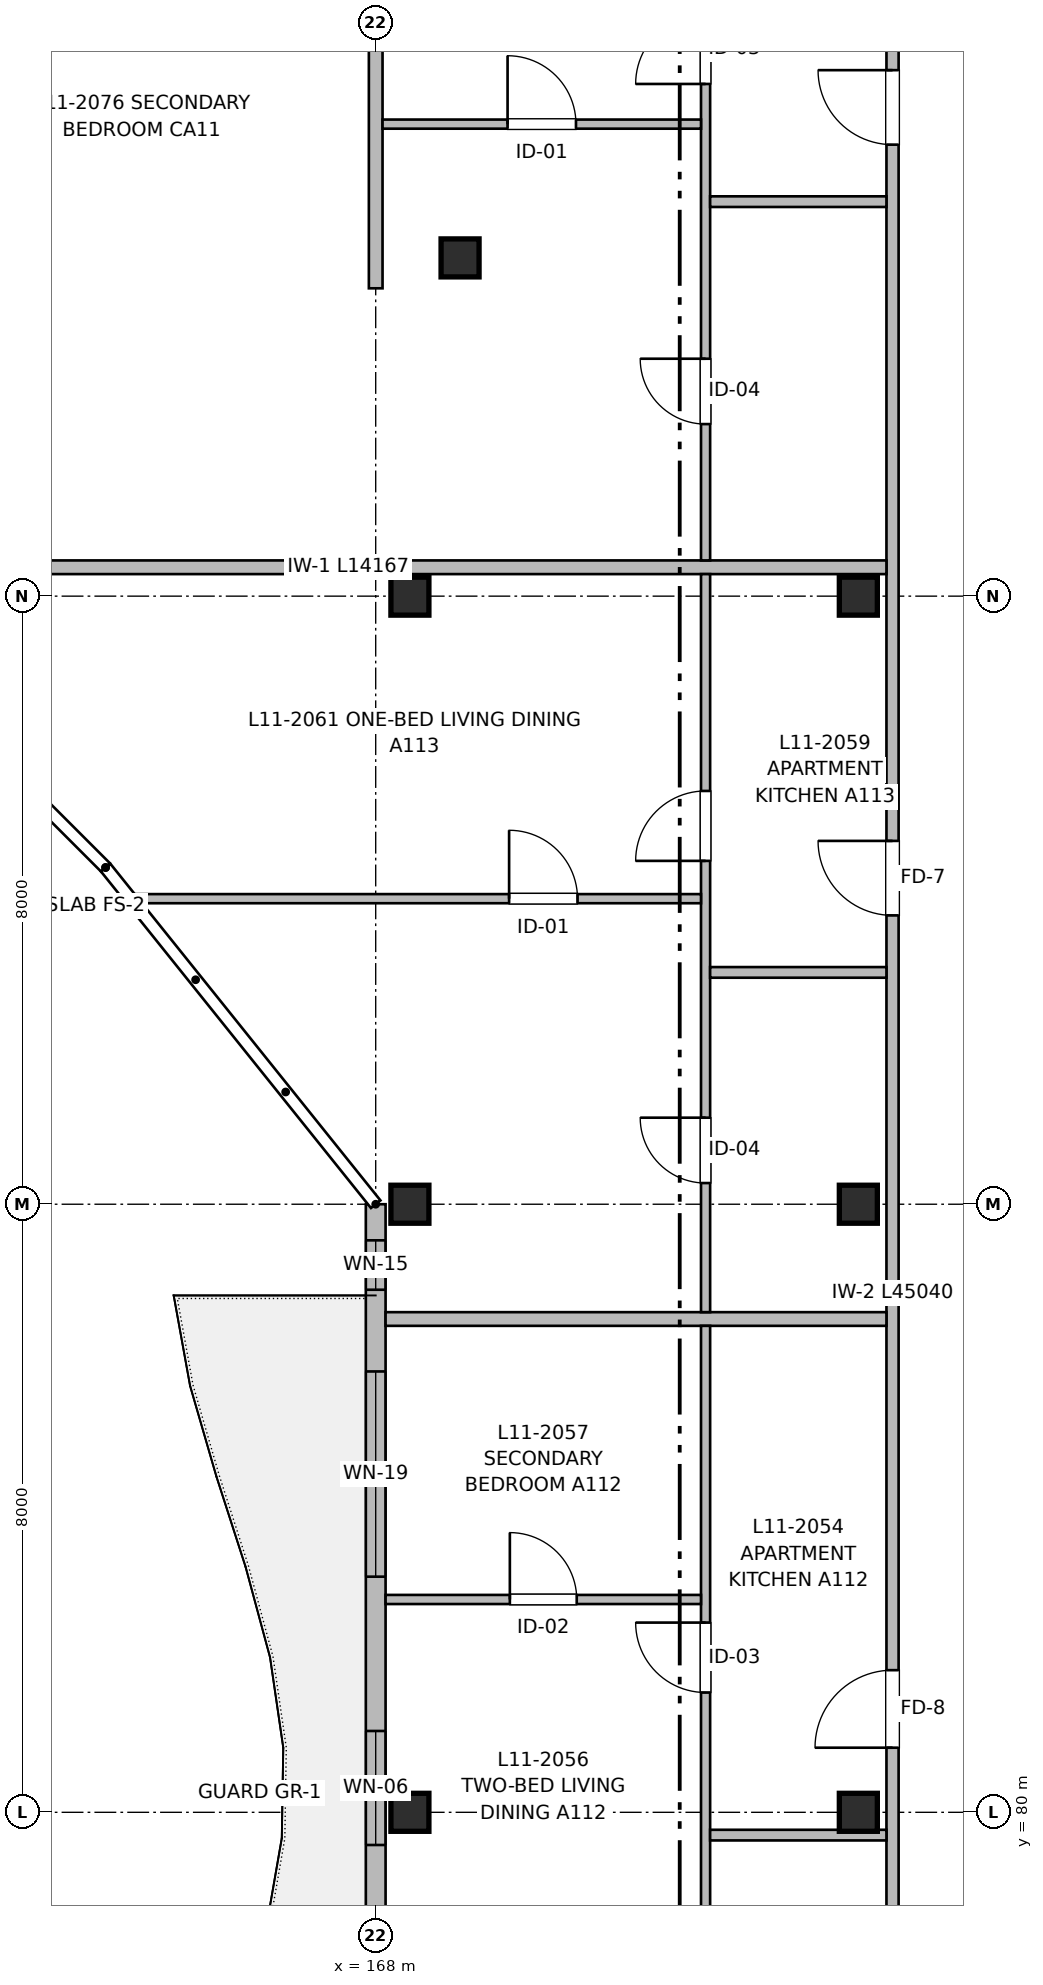
"""IFC4 building model, lengths in metres.
Left out: names, types, materials, properties, quantities, classifications, styles, units other than length and angle.
Written with IfcOpenShell. Run it as: python <this file> out.ifc"""

import sys

from ifc_helpers import new_model, si_unit, direction, frame, frame_2d, origin, origin_2d, place, context, subcontext, project, spatial, rectangle, extrude, element, fill, save


model = new_model("IFC4")
c1 = context("Model", 3, precision=1e-05, world=origin(), true_north=direction((0.0, 1.0)))
c2 = subcontext(c1, "Body", "Model", "MODEL_VIEW")
j1 = project(units=[si_unit("LENGTHUNIT", "METRE"), si_unit("PLANEANGLEUNIT", "RADIAN")], contexts=[c1])
p1 = place(None, origin())
s1 = spatial("IfcSite", under=j1, at=p1, CompositionType="ELEMENT")
p2 = place(p1, origin())
s2 = spatial("IfcBuilding", under=s1, at=p2, CompositionType="ELEMENT")
p3 = place(p2, frame((0.0, 0.0, 36.16)))
s3 = spatial("IfcBuildingStorey", under=s2, at=p3, CompositionType="ELEMENT", Elevation=36.16)
for number, where, z_axis, x_axis in (
    (1, (168.45, 80.0, 0.0), (0.0, 0.0, 1.0), (1.0, 0.0, 0.0)),
    (2, (168.45, 88.0, 0.0), (0.0, 0.0, 1.0), (1.0, 0.0, 0.0)),
    (3, (168.45, 96.0, 0.0), (0.0, 0.0, 1.0), (1.0, 0.0, 0.0)),
    (4, (169.11, 100.45, 0.0), (0.0, 0.0, 1.0), (1.0, 0.0, 0.0)),
    (5, (174.35, 80.0, 0.0), (0.0, 0.0, 1.0), (1.0, 0.0, 0.0)),
    (6, (174.35, 88.0, 0.0), (0.0, 0.0, 1.0), (1.0, 0.0, 0.0)),
    (7, (174.35, 96.0, 0.0), (0.0, 0.0, 1.0), (1.0, 0.0, 0.0)),
):
    element("IfcColumn", number, at=place(p3, frame(where, z_axis=z_axis, x_axis=x_axis)), inside=s3, PredefinedType="COLUMN", context=c2, shape_type="SweptSolid", body=[
        extrude(rectangle(XDim=0.5, YDim=0.5, at=origin_2d()), origin(), (0.0, 0.0, 1.0), 3.2),
    ])
p4 = place(p3, frame((168.0, 61.6, 0.0), z_axis=(0.0, 0.0, 1.0), x_axis=(0.0, 1.0, 0.0)))
e8 = element("IfcWall", 8, at=p4, inside=s3, PredefinedType="SOLIDWALL", context=c2, shape_type="SweptSolid", body=[
    extrude(rectangle(XDim=26.4, YDim=0.26, at=frame_2d((13.2, 0.0))), origin(), (0.0, 0.0, 1.0), 2.98),
])
p5 = place(p4, frame((3.8, 0.0, 0.0)))
e9 = element("IfcOpeningElement", 9, at=p5, cuts=e8, PredefinedType="OPENING", context=c2, shape_type="SweptSolid", body=[
    extrude(rectangle(XDim=1.2, YDim=2.2, at=frame_2d((0.6, 1.1))), frame((0.0, 0.14, 0.0), z_axis=(0.0, -1.0, 0.0), x_axis=(1.0, 0.0, 0.0)), (0.0, 0.0, 1.0), 0.28),
])
p6 = place(p4, frame((5.25, 0.0, 0.87)))
e10 = element("IfcOpeningElement", 10, at=p6, cuts=e8, PredefinedType="OPENING", context=c2, shape_type="SweptSolid", body=[
    extrude(rectangle(XDim=1.25, YDim=1.35, at=frame_2d((0.625, 0.675))), frame((0.0, 0.14, 0.0), z_axis=(0.0, -1.0, 0.0), x_axis=(1.0, 0.0, 0.0)), (0.0, 0.0, 1.0), 0.28),
])
p7 = place(p4, frame((12.65, 0.0, 0.62)))
e11 = element("IfcOpeningElement", 11, at=p7, cuts=e8, PredefinedType="OPENING", context=c2, shape_type="SweptSolid", body=[
    extrude(rectangle(XDim=1.1, YDim=1.6, at=frame_2d((0.55, 0.8))), frame((0.0, 0.14, 0.0), z_axis=(0.0, -1.0, 0.0), x_axis=(1.0, 0.0, 0.0)), (0.0, 0.0, 1.0), 0.28),
])
p8 = place(p4, frame((21.5, 0.0, 0.47)))
e12 = element("IfcOpeningElement", 12, at=p8, cuts=e8, PredefinedType="OPENING", context=c2, shape_type="SweptSolid", body=[
    extrude(rectangle(XDim=2.7, YDim=1.75, at=frame_2d((1.35, 0.875))), frame((0.0, 0.14, 0.0), z_axis=(0.0, -1.0, 0.0), x_axis=(1.0, 0.0, 0.0)), (0.0, 0.0, 1.0), 0.28),
])
p9 = place(p4, frame((8.835, 0.0, 0.82)))
e13 = element("IfcOpeningElement", 13, at=p9, cuts=e8, PredefinedType="OPENING", context=c2, shape_type="SweptSolid", body=[
    extrude(rectangle(XDim=1.5, YDim=1.4, at=frame_2d((0.75, 0.7))), frame((0.0, 0.14, 0.0), z_axis=(0.0, -1.0, 0.0), x_axis=(1.0, 0.0, 0.0)), (0.0, 0.0, 1.0), 0.28),
])
p10 = place(p4, frame((17.97, 0.0, 0.82)))
e14 = element("IfcOpeningElement", 14, at=p10, cuts=e8, PredefinedType="OPENING", context=c2, shape_type="SweptSolid", body=[
    extrude(rectangle(XDim=1.5, YDim=1.4, at=frame_2d((0.75, 0.7))), frame((0.0, 0.14, 0.0), z_axis=(0.0, -1.0, 0.0), x_axis=(1.0, 0.0, 0.0)), (0.0, 0.0, 1.0), 0.28),
])
p11 = place(p4, frame((25.275, 0.0, 0.9)))
e15 = element("IfcOpeningElement", 15, at=p11, cuts=e8, PredefinedType="OPENING", context=c2, shape_type="SweptSolid", body=[
    extrude(rectangle(XDim=0.65, YDim=0.95, at=frame_2d((0.325, 0.475))), frame((0.0, 0.14, 0.0), z_axis=(0.0, -1.0, 0.0), x_axis=(1.0, 0.0, 0.0)), (0.0, 0.0, 1.0), 0.28),
])
p12 = place(p3, frame((174.8, 61.76, 0.0), z_axis=(0.0, 0.0, 1.0), x_axis=(0.0, 1.0, 0.0)))
e16 = element("IfcWall", 16, at=p12, inside=s3, PredefinedType="PARTITIONING", context=c2, shape_type="SweptSolid", body=[
    extrude(rectangle(XDim=45.04, YDim=0.16, at=frame_2d((22.52, 0.0))), origin(), (0.0, 0.0, 1.0), 2.935),
])
p13 = place(p12, frame((6.29, 0.0, 0.0)))
e17 = element("IfcOpeningElement", 17, at=p13, cuts=e16, PredefinedType="OPENING", context=c2, shape_type="SweptSolid", body=[
    extrude(rectangle(XDim=0.98, YDim=2.15, at=frame_2d((0.49, 1.075))), frame((0.0, 0.09, 0.0), z_axis=(0.0, -1.0, 0.0), x_axis=(1.0, 0.0, 0.0)), (0.0, 0.0, 1.0), 0.18),
])
p14 = place(p12, frame((19.09, 0.0, 0.0)))
e18 = element("IfcOpeningElement", 18, at=p14, cuts=e16, PredefinedType="OPENING", context=c2, shape_type="SweptSolid", body=[
    extrude(rectangle(XDim=1.02, YDim=2.15, at=frame_2d((0.51, 1.075))), frame((0.0, 0.09, 0.0), z_axis=(0.0, -1.0, 0.0), x_axis=(1.0, 0.0, 0.0)), (0.0, 0.0, 1.0), 0.18),
])
p15 = place(p12, frame((30.04, 0.0, 0.0)))
e19 = element("IfcOpeningElement", 19, at=p15, cuts=e16, PredefinedType="OPENING", context=c2, shape_type="SweptSolid", body=[
    extrude(rectangle(XDim=0.98, YDim=2.15, at=frame_2d((0.49, 1.075))), frame((0.0, 0.09, 0.0), z_axis=(0.0, -1.0, 0.0), x_axis=(1.0, 0.0, 0.0)), (0.0, 0.0, 1.0), 0.18),
])
p16 = place(p12, frame((40.18, 0.0, 0.0)))
e20 = element("IfcOpeningElement", 20, at=p16, cuts=e16, PredefinedType="OPENING", context=c2, shape_type="SweptSolid", body=[
    extrude(rectangle(XDim=0.98, YDim=2.15, at=frame_2d((0.49, 1.075))), frame((0.0, 0.09, 0.0), z_axis=(0.0, -1.0, 0.0), x_axis=(1.0, 0.0, 0.0)), (0.0, 0.0, 1.0), 0.18),
])
p17 = place(p3, frame((168.0, 100.05, 0.0), z_axis=(0.0, 0.0, 1.0), x_axis=(0.0, 1.0, 0.0)))
e21 = element("IfcWall", 21, at=p17, inside=s3, PredefinedType="PARTITIONING", context=c2, shape_type="SweptSolid", body=[
    extrude(rectangle(XDim=6.67, YDim=0.18, at=frame_2d((3.335, 0.0))), origin(), (0.0, 0.0, 1.0), 2.935),
])
p18 = place(p3, frame((168.13, 86.49, 0.0), z_axis=(0.0, 0.0, 1.0), x_axis=(1.0, 0.0, 0.0)))
e22 = element("IfcWall", 22, at=p18, inside=s3, PredefinedType="PARTITIONING", context=c2, shape_type="SweptSolid", body=[
    extrude(rectangle(XDim=6.59, YDim=0.18, at=frame_2d((3.295, 0.0))), origin(), (0.0, 0.0, 1.0), 2.935),
])
p19 = place(p3, frame((160.552, 96.38, 0.0), z_axis=(0.0, 0.0, 1.0), x_axis=(1.0, 0.0, 0.0)))
e23 = element("IfcWall", 23, at=p19, inside=s3, PredefinedType="PARTITIONING", context=c2, shape_type="SweptSolid", body=[
    extrude(rectangle(XDim=14.167, YDim=0.18, at=frame_2d((7.084, 0.0))), origin(), (0.0, 0.0, 1.0), 2.935),
])
p20 = place(p3, frame((172.34, 73.99, 0.0), z_axis=(0.0, 0.0, 1.0), x_axis=(0.0, 1.0, 0.0)))
e24 = element("IfcWall", 24, at=p20, inside=s3, PredefinedType="PARTITIONING", context=c2, shape_type="SweptSolid", body=[
    extrude(rectangle(XDim=12.41, YDim=0.12, at=frame_2d((6.205, 0.0))), origin(), (0.0, 0.0, 1.0), 2.935),
])
p21 = place(p20, frame((2.17, 0.0, 0.0)))
e25 = element("IfcOpeningElement", 25, at=p21, cuts=e24, PredefinedType="OPENING", context=c2, shape_type="SweptSolid", body=[
    extrude(rectangle(XDim=0.94, YDim=2.1, at=frame_2d((0.47, 1.05))), frame((0.0, 0.07, 0.0), z_axis=(0.0, -1.0, 0.0), x_axis=(1.0, 0.0, 0.0)), (0.0, 0.0, 1.0), 0.14),
])
p22 = place(p20, frame((7.586, 0.0, 0.0)))
e26 = element("IfcOpeningElement", 26, at=p22, cuts=e24, PredefinedType="OPENING", context=c2, shape_type="SweptSolid", body=[
    extrude(rectangle(XDim=0.92, YDim=2.1, at=frame_2d((0.46, 1.05))), frame((0.0, 0.07, 0.0), z_axis=(0.0, -1.0, 0.0), x_axis=(1.0, 0.0, 0.0)), (0.0, 0.0, 1.0), 0.14),
])
p23 = place(p3, frame((172.4, 79.7, 0.0), z_axis=(0.0, 0.0, 1.0), x_axis=(1.0, 0.0, 0.0)))
e27 = element("IfcWall", 27, at=p23, inside=s3, PredefinedType="PARTITIONING", context=c2, shape_type="SweptSolid", body=[
    extrude(rectangle(XDim=2.32, YDim=0.14, at=frame_2d((1.16, 0.0))), origin(), (0.0, 0.0, 1.0), 2.935),
])
p24 = place(p3, frame((168.13, 82.8, 0.0), z_axis=(0.0, 0.0, 1.0), x_axis=(1.0, 0.0, 0.0)))
e28 = element("IfcWall", 28, at=p24, inside=s3, PredefinedType="PARTITIONING", context=c2, shape_type="SweptSolid", body=[
    extrude(rectangle(XDim=4.15, YDim=0.12, at=frame_2d((2.075, 0.0))), origin(), (0.0, 0.0, 1.0), 2.935),
])
p25 = place(p24, frame((1.635, 0.0, 0.0)))
e29 = element("IfcOpeningElement", 29, at=p25, cuts=e28, PredefinedType="OPENING", context=c2, shape_type="SweptSolid", body=[
    extrude(rectangle(XDim=0.88, YDim=2.1, at=frame_2d((0.44, 1.05))), frame((0.0, 0.07, 0.0), z_axis=(0.0, -1.0, 0.0), x_axis=(1.0, 0.0, 0.0)), (0.0, 0.0, 1.0), 0.14),
])
p26 = place(p3, frame((172.34, 86.58, 0.0), z_axis=(0.0, 0.0, 1.0), x_axis=(0.0, 1.0, 0.0)))
e30 = element("IfcWall", 30, at=p26, inside=s3, PredefinedType="PARTITIONING", context=c2, shape_type="SweptSolid", body=[
    extrude(rectangle(XDim=9.71, YDim=0.12, at=frame_2d((4.855, 0.0))), origin(), (0.0, 0.0, 1.0), 2.935),
])
p27 = place(p26, frame((1.698, 0.0, 0.0)))
e31 = element("IfcOpeningElement", 31, at=p27, cuts=e30, PredefinedType="OPENING", context=c2, shape_type="SweptSolid", body=[
    extrude(rectangle(XDim=0.86, YDim=2.1, at=frame_2d((0.43, 1.05))), frame((0.0, 0.07, 0.0), z_axis=(0.0, -1.0, 0.0), x_axis=(1.0, 0.0, 0.0)), (0.0, 0.0, 1.0), 0.14),
])
p28 = place(p26, frame((5.937, 0.0, 0.0)))
e32 = element("IfcOpeningElement", 32, at=p28, cuts=e30, PredefinedType="OPENING", context=c2, shape_type="SweptSolid", body=[
    extrude(rectangle(XDim=0.92, YDim=2.1, at=frame_2d((0.46, 1.05))), frame((0.0, 0.07, 0.0), z_axis=(0.0, -1.0, 0.0), x_axis=(1.0, 0.0, 0.0)), (0.0, 0.0, 1.0), 0.14),
])
p29 = place(p3, frame((172.4, 91.05, 0.0), z_axis=(0.0, 0.0, 1.0), x_axis=(1.0, 0.0, 0.0)))
e33 = element("IfcWall", 33, at=p29, inside=s3, PredefinedType="PARTITIONING", context=c2, shape_type="SweptSolid", body=[
    extrude(rectangle(XDim=2.32, YDim=0.14, at=frame_2d((1.16, 0.0))), origin(), (0.0, 0.0, 1.0), 2.935),
])
p30 = place(p3, frame((164.826, 92.02, 0.0), z_axis=(0.0, 0.0, 1.0), x_axis=(1.0, 0.0, 0.0)))
e34 = element("IfcWall", 34, at=p30, inside=s3, PredefinedType="PARTITIONING", context=c2, shape_type="SweptSolid", body=[
    extrude(rectangle(XDim=7.454, YDim=0.12, at=frame_2d((3.727, 0.0))), origin(), (0.0, 0.0, 1.0), 2.935),
])
p31 = place(p30, frame((4.929, 0.0, 0.0)))
e35 = element("IfcOpeningElement", 35, at=p31, cuts=e34, PredefinedType="OPENING", context=c2, shape_type="SweptSolid", body=[
    extrude(rectangle(XDim=0.9, YDim=2.1, at=frame_2d((0.45, 1.05))), frame((0.0, 0.07, 0.0), z_axis=(0.0, -1.0, 0.0), x_axis=(1.0, 0.0, 0.0)), (0.0, 0.0, 1.0), 0.14),
])
p32 = place(p3, frame((172.34, 96.47, 0.0), z_axis=(0.0, 0.0, 1.0), x_axis=(0.0, 1.0, 0.0)))
e36 = element("IfcWall", 36, at=p32, inside=s3, PredefinedType="PARTITIONING", context=c2, shape_type="SweptSolid", body=[
    extrude(rectangle(XDim=10.25, YDim=0.12, at=frame_2d((5.125, 0.0))), origin(), (0.0, 0.0, 1.0), 2.935),
])
p33 = place(p32, frame((1.794, 0.0, 0.0)))
e37 = element("IfcOpeningElement", 37, at=p33, cuts=e36, PredefinedType="OPENING", context=c2, shape_type="SweptSolid", body=[
    extrude(rectangle(XDim=0.86, YDim=2.1, at=frame_2d((0.43, 1.05))), frame((0.0, 0.07, 0.0), z_axis=(0.0, -1.0, 0.0), x_axis=(1.0, 0.0, 0.0)), (0.0, 0.0, 1.0), 0.14),
])
p34 = place(p32, frame((6.268, 0.0, 0.0)))
e38 = element("IfcOpeningElement", 38, at=p34, cuts=e36, PredefinedType="OPENING", context=c2, shape_type="SweptSolid", body=[
    extrude(rectangle(XDim=0.92, YDim=2.1, at=frame_2d((0.46, 1.05))), frame((0.0, 0.07, 0.0), z_axis=(0.0, -1.0, 0.0), x_axis=(1.0, 0.0, 0.0)), (0.0, 0.0, 1.0), 0.14),
])
p35 = place(p3, frame((172.4, 101.19, 0.0), z_axis=(0.0, 0.0, 1.0), x_axis=(1.0, 0.0, 0.0)))
e39 = element("IfcWall", 39, at=p35, inside=s3, PredefinedType="PARTITIONING", context=c2, shape_type="SweptSolid", body=[
    extrude(rectangle(XDim=2.32, YDim=0.14, at=frame_2d((1.16, 0.0))), origin(), (0.0, 0.0, 1.0), 2.935),
])
p36 = place(p3, frame((168.09, 102.21, 0.0), z_axis=(0.0, 0.0, 1.0), x_axis=(1.0, 0.0, 0.0)))
e40 = element("IfcWall", 40, at=p36, inside=s3, PredefinedType="PARTITIONING", context=c2, shape_type="SweptSolid", body=[
    extrude(rectangle(XDim=4.19, YDim=0.12, at=frame_2d((2.095, 0.0))), origin(), (0.0, 0.0, 1.0), 2.935),
])
p37 = place(p36, frame((1.645, 0.0, 0.0)))
e41 = element("IfcOpeningElement", 41, at=p37, cuts=e40, PredefinedType="OPENING", context=c2, shape_type="SweptSolid", body=[
    extrude(rectangle(XDim=0.9, YDim=2.1, at=frame_2d((0.45, 1.05))), frame((0.0, 0.07, 0.0), z_axis=(0.0, -1.0, 0.0), x_axis=(1.0, 0.0, 0.0)), (0.0, 0.0, 1.0), 0.14),
])
p38 = place(p8, origin())
e42 = element("IfcWindow", 42, at=p38, inside=s3, PartitioningType="SINGLE_PANEL", PredefinedType="WINDOW", context=c2, shape_type="SweptSolid", body=[
    extrude(rectangle(XDim=2.7, YDim=1.75, at=frame_2d((1.35, 0.875))), frame((0.0, 0.03, 0.0), z_axis=(0.0, -1.0, 0.0), x_axis=(1.0, 0.0, 0.0)), (0.0, 0.0, 1.0), 0.06),
])
fill(e12, e42)
p39 = place(p22, origin())
e43 = element("IfcDoor", 43, at=p39, inside=s3, OperationType="SINGLE_SWING_RIGHT", PredefinedType="DOOR", context=c2, shape_type="SweptSolid", body=[
    extrude(rectangle(XDim=0.92, YDim=2.1, at=frame_2d((0.46, 1.05))), frame((0.0, 0.025, 0.0), z_axis=(0.0, -1.0, 0.0), x_axis=(1.0, 0.0, 0.0)), (0.0, 0.0, 1.0), 0.05),
])
fill(e26, e43)
p40 = place(p14, origin())
e44 = element("IfcDoor", 44, at=p40, inside=s3, OperationType="SINGLE_SWING_LEFT", PredefinedType="DOOR", context=c2, shape_type="SweptSolid", body=[
    extrude(rectangle(XDim=1.02, YDim=2.15, at=frame_2d((0.51, 1.075))), frame((0.0, 0.025, 0.0), z_axis=(0.0, -1.0, 0.0), x_axis=(1.0, 0.0, 0.0)), (0.0, 0.0, 1.0), 0.05),
])
fill(e18, e44)
p41 = place(p25, origin())
e45 = element("IfcDoor", 45, at=p41, inside=s3, OperationType="SINGLE_SWING_LEFT", PredefinedType="DOOR", context=c2, shape_type="SweptSolid", body=[
    extrude(rectangle(XDim=0.88, YDim=2.1, at=frame_2d((0.44, 1.05))), frame((0.0, 0.025, 0.0), z_axis=(0.0, -1.0, 0.0), x_axis=(1.0, 0.0, 0.0)), (0.0, 0.0, 1.0), 0.05),
])
fill(e29, e45)
p42 = place(p27, origin())
e46 = element("IfcDoor", 46, at=p42, inside=s3, OperationType="SINGLE_SWING_RIGHT", PredefinedType="DOOR", context=c2, shape_type="SweptSolid", body=[
    extrude(rectangle(XDim=0.86, YDim=2.1, at=frame_2d((0.43, 1.05))), frame((0.0, 0.025, 0.0), z_axis=(0.0, -1.0, 0.0), x_axis=(1.0, 0.0, 0.0)), (0.0, 0.0, 1.0), 0.05),
])
fill(e31, e46)
p43 = place(p28, origin())
e47 = element("IfcDoor", 47, at=p43, inside=s3, OperationType="SINGLE_SWING_LEFT", PredefinedType="DOOR", context=c2, shape_type="SweptSolid", body=[
    extrude(rectangle(XDim=0.92, YDim=2.1, at=frame_2d((0.46, 1.05))), frame((0.0, 0.025, 0.0), z_axis=(0.0, -1.0, 0.0), x_axis=(1.0, 0.0, 0.0)), (0.0, 0.0, 1.0), 0.05),
])
fill(e32, e47)
p44 = place(p15, origin())
e48 = element("IfcDoor", 48, at=p44, inside=s3, OperationType="SINGLE_SWING_RIGHT", PredefinedType="DOOR", context=c2, shape_type="SweptSolid", body=[
    extrude(rectangle(XDim=0.98, YDim=2.15, at=frame_2d((0.49, 1.075))), frame((0.0, 0.025, 0.0), z_axis=(0.0, -1.0, 0.0), x_axis=(1.0, 0.0, 0.0)), (0.0, 0.0, 1.0), 0.05),
])
fill(e19, e48)
p45 = place(p31, origin())
e49 = element("IfcDoor", 49, at=p45, inside=s3, OperationType="SINGLE_SWING_LEFT", PredefinedType="DOOR", context=c2, shape_type="SweptSolid", body=[
    extrude(rectangle(XDim=0.9, YDim=2.1, at=frame_2d((0.45, 1.05))), frame((0.0, 0.025, 0.0), z_axis=(0.0, -1.0, 0.0), x_axis=(1.0, 0.0, 0.0)), (0.0, 0.0, 1.0), 0.05),
])
fill(e35, e49)
p46 = place(p33, origin())
e50 = element("IfcDoor", 50, at=p46, inside=s3, OperationType="SINGLE_SWING_RIGHT", PredefinedType="DOOR", context=c2, shape_type="SweptSolid", body=[
    extrude(rectangle(XDim=0.86, YDim=2.1, at=frame_2d((0.43, 1.05))), frame((0.0, 0.025, 0.0), z_axis=(0.0, -1.0, 0.0), x_axis=(1.0, 0.0, 0.0)), (0.0, 0.0, 1.0), 0.05),
])
fill(e37, e50)
p47 = place(p34, origin())
e51 = element("IfcDoor", 51, at=p47, inside=s3, OperationType="SINGLE_SWING_LEFT", PredefinedType="DOOR", context=c2, shape_type="SweptSolid", body=[
    extrude(rectangle(XDim=0.92, YDim=2.1, at=frame_2d((0.46, 1.05))), frame((0.0, 0.025, 0.0), z_axis=(0.0, -1.0, 0.0), x_axis=(1.0, 0.0, 0.0)), (0.0, 0.0, 1.0), 0.05),
])
fill(e38, e51)
p48 = place(p16, origin())
e52 = element("IfcDoor", 52, at=p48, inside=s3, OperationType="SINGLE_SWING_RIGHT", PredefinedType="DOOR", context=c2, shape_type="SweptSolid", body=[
    extrude(rectangle(XDim=0.98, YDim=2.15, at=frame_2d((0.49, 1.075))), frame((0.0, 0.025, 0.0), z_axis=(0.0, -1.0, 0.0), x_axis=(1.0, 0.0, 0.0)), (0.0, 0.0, 1.0), 0.05),
])
fill(e20, e52)
p49 = place(p37, origin())
e53 = element("IfcDoor", 53, at=p49, inside=s3, OperationType="SINGLE_SWING_LEFT", PredefinedType="DOOR", context=c2, shape_type="SweptSolid", body=[
    extrude(rectangle(XDim=0.9, YDim=2.1, at=frame_2d((0.45, 1.05))), frame((0.0, 0.025, 0.0), z_axis=(0.0, -1.0, 0.0), x_axis=(1.0, 0.0, 0.0)), (0.0, 0.0, 1.0), 0.05),
])
fill(e41, e53)
p50 = place(p10, origin())
e54 = element("IfcWindow", 54, at=p50, inside=s3, PartitioningType="SINGLE_PANEL", PredefinedType="WINDOW", context=c2, shape_type="SweptSolid", body=[
    extrude(rectangle(XDim=1.5, YDim=1.4, at=frame_2d((0.75, 0.7))), frame((0.0, 0.03, 0.0), z_axis=(0.0, -1.0, 0.0), x_axis=(1.0, 0.0, 0.0)), (0.0, 0.0, 1.0), 0.06),
])
fill(e14, e54)
p51 = place(p11, origin())
e55 = element("IfcWindow", 55, at=p51, inside=s3, PartitioningType="SINGLE_PANEL", PredefinedType="WINDOW", context=c2, shape_type="SweptSolid", body=[
    extrude(rectangle(XDim=0.65, YDim=0.95, at=frame_2d((0.325, 0.475))), frame((0.0, 0.03, 0.0), z_axis=(0.0, -1.0, 0.0), x_axis=(1.0, 0.0, 0.0)), (0.0, 0.0, 1.0), 0.06),
])
fill(e15, e55)
save(model, sys.argv[1])
